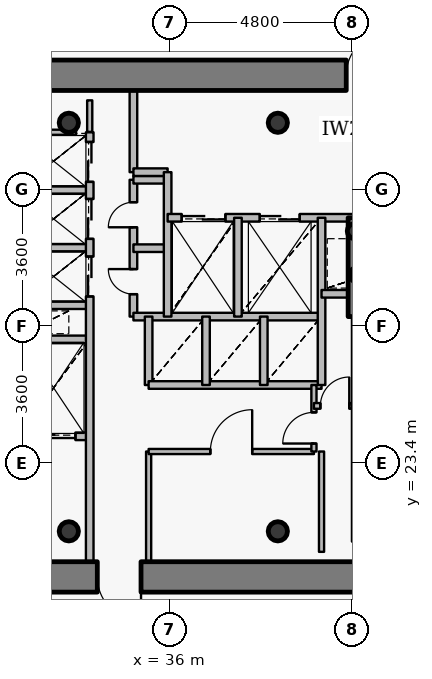
"""IFC4 building model, lengths in metres.
Left out: names, types, materials, properties, quantities, classifications, styles, units other than length and angle.
Written with IfcOpenShell. Run it as: python <this file> out.ifc"""

import sys

from ifc_helpers import new_model, si_unit, direction, frame, frame_2d, origin, origin_2d, place, context, subcontext, project, spatial, rectangle, hollow_circle, extrude, source, transform, mapped, element, fill, save


model = new_model("IFC4")
c1 = context("Model", 3, precision=1e-05, world=origin(), true_north=direction((0.0, 1.0)))
c2 = subcontext(c1, "Body", "Model", "MODEL_VIEW")
j1 = project(units=[si_unit("LENGTHUNIT", "METRE"), si_unit("PLANEANGLEUNIT", "RADIAN")], contexts=[c1])
p1 = place(None, origin())
s1 = spatial("IfcSite", under=j1, at=p1, CompositionType="ELEMENT")
p2 = place(p1, origin())
s2 = spatial("IfcBuilding", under=s1, at=p2, CompositionType="ELEMENT")
p3 = place(p2, frame((0.0, 0.0, 197.4)))
s3 = spatial("IfcBuildingStorey", under=s2, at=p3, CompositionType="ELEMENT", Elevation=197.4)
for number, where, z_axis, x_axis in (
    (1, (33.35, 21.6, 0.0), (0.0, 0.0, 1.0), (1.0, 0.0, 0.0)),
    (2, (38.85, 21.6, 0.0), (0.0, 0.0, 1.0), (1.0, 0.0, 0.0)),
    (3, (38.85, 32.35, 0.0), (0.0, 0.0, 1.0), (1.0, 0.0, 0.0)),
    (4, (33.35, 32.35, 0.0), (0.0, 0.0, 1.0), (1.0, 0.0, 0.0)),
):
    element("IfcColumn", number, at=place(p3, frame(where, z_axis=z_axis, x_axis=x_axis)), inside=s3, PredefinedType="COLUMN", context=c2, shape_type="SweptSolid", body=[
        extrude(hollow_circle(Radius=0.254, WallThickness=0.02, at=origin_2d()), origin(), (0.0, 0.0, 1.0), 3.75),
    ])
for number, where, z_axis, x_axis in (
    (5, (40.95, 28.35, 0.0), (0.0, 0.0, 1.0), (1.0, 0.0, 0.0)),
    (6, (40.88, 29.5, 0.0), (0.0, 0.0, 1.0), (1.0, 0.0, 0.0)),
):
    element("IfcColumn", number, at=place(p3, frame(where, z_axis=z_axis, x_axis=x_axis)), inside=s3, PredefinedType="COLUMN", context=c2, shape_type="SweptSolid", body=[
        extrude(hollow_circle(Radius=0.203, WallThickness=0.016, at=origin_2d()), origin(), (0.0, 0.0, 1.0), 3.75),
    ])
p4 = place(p3, frame((27.2, 33.6, 0.0), z_axis=(0.0, 0.0, 1.0), x_axis=(1.0, 0.0, 0.0)))
e7 = element("IfcWall", 7, at=p4, inside=s3, PredefinedType="SHEAR", context=c2, shape_type="SweptSolid", body=[
    extrude(rectangle(XDim=17.6, YDim=0.8, at=frame_2d((8.8, 0.0))), origin(), (0.0, 0.0, 1.0), 2.95),
])
p5 = place(p4, frame((13.45, 0.0, 0.0)))
e8 = element("IfcOpeningElement", 8, at=p5, cuts=e7, PredefinedType="OPENING", context=c2, shape_type="SweptSolid", body=[
    extrude(rectangle(XDim=1.15, YDim=2.15, at=origin_2d()), frame((0.575, 0.41, 1.075), z_axis=(0.0, -1.0, 0.0), x_axis=(1.0, 0.0, 0.0)), (0.0, 0.0, 1.0), 0.82),
])
p6 = place(p3, frame((44.8, 20.4, 0.0), z_axis=(0.0, 0.0, 1.0), x_axis=(-1.0, 0.0, 0.0)))
e9 = element("IfcWall", 9, at=p6, inside=s3, PredefinedType="SHEAR", context=c2, shape_type="SweptSolid", body=[
    extrude(rectangle(XDim=17.6, YDim=0.8, at=frame_2d((8.8, 0.0))), origin(), (0.0, 0.0, 1.0), 2.95),
])
p7 = place(p6, frame((9.55, 0.0, 0.0)))
e10 = element("IfcOpeningElement", 10, at=p7, cuts=e9, PredefinedType="OPENING", context=c2, shape_type="SweptSolid", body=[
    extrude(rectangle(XDim=1.15, YDim=2.15, at=origin_2d()), frame((0.575, 0.41, 1.075), z_axis=(0.0, -1.0, 0.0), x_axis=(1.0, 0.0, 0.0)), (0.0, 0.0, 1.0), 0.82),
])
p8 = place(p3, frame((40.9, 27.25, 0.0), z_axis=(0.0, 0.0, 1.0), x_axis=(0.0, 1.0, 0.0)))
e11 = element("IfcWall", 11, at=p8, inside=s3, PredefinedType="SHEAR", context=c2, shape_type="SweptSolid", body=[
    extrude(rectangle(XDim=2.6, YDim=0.4, at=frame_2d((1.3, 0.0))), origin(), (0.0, 0.0, 1.0), 3.1),
])
p9 = place(p3, frame((32.0, 24.1, 0.0), z_axis=(0.0, 0.0, 1.0), x_axis=(1.0, 0.0, 0.0)))
e12 = element("IfcWall", 12, at=p9, inside=s3, PredefinedType="PARTITIONING", context=c2, shape_type="SweptSolid", body=[
    extrude(rectangle(XDim=1.9, YDim=0.2, at=frame_2d((0.95, 0.0))), origin(), (0.0, 0.0, 1.0), 3.085),
])
p10 = place(p9, frame((0.375, 0.0, 0.0)))
e13 = element("IfcOpeningElement", 13, at=p10, cuts=e12, PredefinedType="OPENING", context=c2, shape_type="SweptSolid", body=[
    extrude(rectangle(XDim=1.15, YDim=2.15, at=origin_2d()), frame((0.575, 0.11, 1.075), z_axis=(0.0, -1.0, 0.0), x_axis=(1.0, 0.0, 0.0)), (0.0, 0.0, 1.0), 0.22),
])
for number, where, z_axis, x_axis in (
    (14, (32.0, 26.65, 0.0), (0.0, 0.0, 1.0), (1.0, 0.0, 0.0)),
    (15, (32.0, 27.55, 0.0), (0.0, 0.0, 1.0), (1.0, 0.0, 0.0)),
    (16, (32.0, 29.06, 0.0), (0.0, 0.0, 1.0), (1.0, 0.0, 0.0)),
    (17, (32.0, 30.58, 0.0), (0.0, 0.0, 1.0), (1.0, 0.0, 0.0)),
):
    element("IfcWall", number, at=place(p3, frame(where, z_axis=z_axis, x_axis=x_axis)), inside=s3, PredefinedType="PARTITIONING", context=c2, shape_type="SweptSolid", body=[
        extrude(rectangle(XDim=1.9, YDim=0.2, at=frame_2d((0.95, 0.0))), origin(), (0.0, 0.0, 1.0), 3.085),
    ])
p11 = place(p3, frame((33.9, 20.8, 0.0), z_axis=(0.0, 0.0, 1.0), x_axis=(0.0, 1.0, 0.0)))
e18 = element("IfcWall", 18, at=p11, inside=s3, PredefinedType="PARTITIONING", context=c2, shape_type="SweptSolid", body=[
    extrude(rectangle(XDim=11.3, YDim=0.2, at=frame_2d((5.65, 0.0))), origin(), (0.0, 0.0, 1.0), 3.085),
])
p12 = place(p11, frame((6.98, 0.0, 0.0)))
e19 = element("IfcOpeningElement", 19, at=p12, cuts=e18, PredefinedType="OPENING", context=c2, shape_type="SweptSolid", body=[
    extrude(rectangle(XDim=1.05, YDim=2.15, at=origin_2d()), frame((0.525, 0.11, 1.075), z_axis=(0.0, -1.0, 0.0), x_axis=(1.0, 0.0, 0.0)), (0.0, 0.0, 1.0), 0.22),
])
p13 = place(p11, frame((8.495, 0.0, 0.0)))
e20 = element("IfcOpeningElement", 20, at=p13, cuts=e18, PredefinedType="OPENING", context=c2, shape_type="SweptSolid", body=[
    extrude(rectangle(XDim=1.05, YDim=2.15, at=origin_2d()), frame((0.525, 0.11, 1.075), z_axis=(0.0, -1.0, 0.0), x_axis=(1.0, 0.0, 0.0)), (0.0, 0.0, 1.0), 0.22),
])
p14 = place(p11, frame((9.995, 0.0, 0.0)))
e21 = element("IfcOpeningElement", 21, at=p14, cuts=e18, PredefinedType="OPENING", context=c2, shape_type="SweptSolid", body=[
    extrude(rectangle(XDim=1.05, YDim=2.15, at=origin_2d()), frame((0.525, 0.11, 1.075), z_axis=(0.0, -1.0, 0.0), x_axis=(1.0, 0.0, 0.0)), (0.0, 0.0, 1.0), 0.22),
])
p15 = place(p3, frame((35.05, 27.25, 0.0), z_axis=(0.0, 0.0, 1.0), x_axis=(0.0, 1.0, 0.0)))
e22 = element("IfcWall", 22, at=p15, inside=s3, PredefinedType="PARTITIONING", context=c2, shape_type="SweptSolid", body=[
    extrude(rectangle(XDim=3.6, YDim=0.2, at=frame_2d((1.8, 0.0))), origin(), (0.0, 0.0, 1.0), 3.5),
])
p16 = place(p15, frame((0.59, 0.0, 0.0)))
e23 = element("IfcOpeningElement", 23, at=p16, cuts=e22, PredefinedType="OPENING", context=c2, shape_type="SweptSolid", body=[
    extrude(rectangle(XDim=0.66, YDim=2.05, at=origin_2d()), frame((0.33, 0.11, 1.025), z_axis=(0.0, -1.0, 0.0), x_axis=(1.0, 0.0, 0.0)), (0.0, 0.0, 1.0), 0.22),
])
p17 = place(p15, frame((2.35, 0.0, 0.0)))
e24 = element("IfcOpeningElement", 24, at=p17, cuts=e22, PredefinedType="OPENING", context=c2, shape_type="SweptSolid", body=[
    extrude(rectangle(XDim=0.66, YDim=2.05, at=origin_2d()), frame((0.33, 0.11, 1.025), z_axis=(0.0, -1.0, 0.0), x_axis=(1.0, 0.0, 0.0)), (0.0, 0.0, 1.0), 0.22),
])
p18 = place(p3, frame((35.05, 27.25, 0.0), z_axis=(0.0, 0.0, 1.0), x_axis=(1.0, 0.0, 0.0)))
e25 = element("IfcWall", 25, at=p18, inside=s3, PredefinedType="PARTITIONING", context=c2, shape_type="SweptSolid", body=[
    extrude(rectangle(XDim=4.95, YDim=0.2, at=frame_2d((2.475, 0.0))), origin(), (0.0, 0.0, 1.0), 3.085),
])
for number, where, z_axis, x_axis in (
    (26, (35.05, 29.05, 0.0), (0.0, 0.0, 1.0), (1.0, 0.0, 0.0)),
    (27, (35.05, 30.85, 0.0), (0.0, 0.0, 1.0), (1.0, 0.0, 0.0)),
):
    element("IfcWall", number, at=place(p3, frame(where, z_axis=z_axis, x_axis=x_axis)), inside=s3, PredefinedType="PARTITIONING", context=c2, shape_type="SweptSolid", body=[
        extrude(rectangle(XDim=0.9, YDim=0.2, at=frame_2d((0.45, 0.0))), origin(), (0.0, 0.0, 1.0), 3.5),
    ])
p19 = place(p3, frame((35.05, 31.05, 0.0), z_axis=(0.0, 0.0, 1.0), x_axis=(0.0, 1.0, 0.0)))
e28 = element("IfcWall", 28, at=p19, inside=s3, PredefinedType="PARTITIONING", context=c2, shape_type="SweptSolid", body=[
    extrude(rectangle(XDim=2.15, YDim=0.2, at=frame_2d((1.075, 0.0))), origin(), (0.0, 0.0, 1.0), 3.085),
])
p20 = place(p3, frame((35.05, 31.05, 0.0), z_axis=(0.0, 0.0, 1.0), x_axis=(1.0, 0.0, 0.0)))
e29 = element("IfcWall", 29, at=p20, inside=s3, PredefinedType="PARTITIONING", context=c2, shape_type="SweptSolid", body=[
    extrude(rectangle(XDim=0.9, YDim=0.2, at=frame_2d((0.45, 0.0))), origin(), (0.0, 0.0, 1.0), 3.5),
])
p21 = place(p3, frame((35.45, 20.8, 0.0), z_axis=(0.0, 0.0, 1.0), x_axis=(0.0, 1.0, 0.0)))
e30 = element("IfcWall", 30, at=p21, inside=s3, PredefinedType="PARTITIONING", context=c2, shape_type="SweptSolid", body=[
    extrude(rectangle(XDim=2.9, YDim=0.135, at=frame_2d((1.45, 0.0))), origin(), (0.0, 0.0, 1.0), 3.085),
])
p22 = place(p3, frame((35.45, 23.7, 0.0), z_axis=(0.0, 0.0, 1.0), x_axis=(1.0, 0.0, 0.0)))
e31 = element("IfcWall", 31, at=p22, inside=s3, PredefinedType="PARTITIONING", context=c2, shape_type="SweptSolid", body=[
    extrude(rectangle(XDim=4.35, YDim=0.135, at=frame_2d((2.175, 0.0))), origin(), (0.0, 0.0, 1.0), 3.085),
])
p23 = place(p22, frame((1.625, 0.0, 0.0)))
e32 = element("IfcOpeningElement", 32, at=p23, cuts=e31, PredefinedType="OPENING", context=c2, shape_type="SweptSolid", body=[
    extrude(rectangle(XDim=1.1, YDim=2.15, at=origin_2d()), frame((0.55, 0.078, 1.075), z_axis=(0.0, -1.0, 0.0), x_axis=(1.0, 0.0, 0.0)), (0.0, 0.0, 1.0), 0.155),
])
p24 = place(p3, frame((35.45, 25.45, 0.0), z_axis=(0.0, 0.0, 1.0), x_axis=(0.0, 1.0, 0.0)))
e33 = element("IfcWall", 33, at=p24, inside=s3, PredefinedType="PARTITIONING", context=c2, shape_type="SweptSolid", body=[
    extrude(rectangle(XDim=1.8, YDim=0.2, at=frame_2d((0.9, 0.0))), origin(), (0.0, 0.0, 1.0), 3.5),
])
p25 = place(p3, frame((35.45, 25.45, 0.0), z_axis=(0.0, 0.0, 1.0), x_axis=(1.0, 0.0, 0.0)))
e34 = element("IfcWall", 34, at=p25, inside=s3, PredefinedType="PARTITIONING", context=c2, shape_type="SweptSolid", body=[
    extrude(rectangle(XDim=4.55, YDim=0.2, at=frame_2d((2.275, 0.0))), origin(), (0.0, 0.0, 1.0), 3.085),
])
p26 = place(p3, frame((35.95, 27.25, 0.0), z_axis=(0.0, 0.0, 1.0), x_axis=(0.0, 1.0, 0.0)))
e35 = element("IfcWall", 35, at=p26, inside=s3, PredefinedType="PARTITIONING", context=c2, shape_type="SweptSolid", body=[
    extrude(rectangle(XDim=3.8, YDim=0.2, at=frame_2d((1.9, 0.0))), origin(), (0.0, 0.0, 1.0), 3.5),
])
p27 = place(p3, frame((35.95, 29.85, 0.0), z_axis=(0.0, 0.0, 1.0), x_axis=(1.0, 0.0, 0.0)))
e36 = element("IfcWall", 36, at=p27, inside=s3, PredefinedType="PARTITIONING", context=c2, shape_type="SweptSolid", body=[
    extrude(rectangle(XDim=8.49, YDim=0.2, at=frame_2d((4.245, 0.0))), origin(), (0.0, 0.0, 1.0), 3.085),
])
p28 = place(p27, frame((6.1, 0.0, 0.0)))
e37 = element("IfcOpeningElement", 37, at=p28, cuts=e36, PredefinedType="OPENING", context=c2, shape_type="SweptSolid", body=[
    extrude(rectangle(XDim=1.2, YDim=2.15, at=origin_2d()), frame((0.6, 0.11, 1.075), z_axis=(0.0, -1.0, 0.0), x_axis=(1.0, 0.0, 0.0)), (0.0, 0.0, 1.0), 0.22),
])
p29 = place(p27, frame((0.37, 0.0, 0.0)))
e38 = element("IfcOpeningElement", 38, at=p29, cuts=e36, PredefinedType="OPENING", context=c2, shape_type="SweptSolid", body=[
    extrude(rectangle(XDim=1.15, YDim=2.15, at=origin_2d()), frame((0.575, 0.11, 1.075), z_axis=(0.0, -1.0, 0.0), x_axis=(1.0, 0.0, 0.0)), (0.0, 0.0, 1.0), 0.22),
])
p30 = place(p27, frame((2.425, 0.0, 0.0)))
e39 = element("IfcOpeningElement", 39, at=p30, cuts=e36, PredefinedType="OPENING", context=c2, shape_type="SweptSolid", body=[
    extrude(rectangle(XDim=1.05, YDim=2.15, at=origin_2d()), frame((0.525, 0.11, 1.075), z_axis=(0.0, -1.0, 0.0), x_axis=(1.0, 0.0, 0.0)), (0.0, 0.0, 1.0), 0.22),
])
p31 = place(p3, frame((36.96, 25.45, 0.0), z_axis=(0.0, 0.0, 1.0), x_axis=(0.0, 1.0, 0.0)))
e40 = element("IfcWall", 40, at=p31, inside=s3, PredefinedType="PARTITIONING", context=c2, shape_type="SweptSolid", body=[
    extrude(rectangle(XDim=1.8, YDim=0.2, at=frame_2d((0.9, 0.0))), origin(), (0.0, 0.0, 1.0), 3.5),
])
p32 = place(p3, frame((37.8, 27.25, 0.0), z_axis=(0.0, 0.0, 1.0), x_axis=(0.0, 1.0, 0.0)))
e41 = element("IfcWall", 41, at=p32, inside=s3, PredefinedType="PARTITIONING", context=c2, shape_type="SweptSolid", body=[
    extrude(rectangle(XDim=2.6, YDim=0.2, at=frame_2d((1.3, 0.0))), origin(), (0.0, 0.0, 1.0), 3.5),
])
p33 = place(p3, frame((38.48, 25.45, 0.0), z_axis=(0.0, 0.0, 1.0), x_axis=(0.0, 1.0, 0.0)))
e42 = element("IfcWall", 42, at=p33, inside=s3, PredefinedType="PARTITIONING", context=c2, shape_type="SweptSolid", body=[
    extrude(rectangle(XDim=1.8, YDim=0.2, at=frame_2d((0.9, 0.0))), origin(), (0.0, 0.0, 1.0), 3.5),
])
p34 = place(p3, frame((39.8, 23.7, 0.0), z_axis=(0.0, 0.0, 1.0), x_axis=(0.0, 1.0, 0.0)))
e43 = element("IfcWall", 43, at=p34, inside=s3, PredefinedType="PARTITIONING", context=c2, shape_type="SweptSolid", body=[
    extrude(rectangle(XDim=1.75, YDim=0.135, at=frame_2d((0.875, 0.0))), origin(), (0.0, 0.0, 1.0), 3.5),
])
p35 = place(p34, frame((0.21, 0.0, 0.0)))
e44 = element("IfcOpeningElement", 44, at=p35, cuts=e43, PredefinedType="OPENING", context=c2, shape_type="SweptSolid", body=[
    extrude(rectangle(XDim=0.82, YDim=2.1, at=origin_2d()), frame((0.41, 0.078, 1.05), z_axis=(0.0, -1.0, 0.0), x_axis=(1.0, 0.0, 0.0)), (0.0, 0.0, 1.0), 0.155),
])
p36 = place(p3, frame((39.8, 24.9, 0.0), z_axis=(0.0, 0.0, 1.0), x_axis=(1.0, 0.0, 0.0)))
e45 = element("IfcWall", 45, at=p36, inside=s3, PredefinedType="PARTITIONING", context=c2, shape_type="SweptSolid", body=[
    extrude(rectangle(XDim=1.1, YDim=0.15, at=frame_2d((0.55, 0.0))), origin(), (0.0, 0.0, 1.0), 3.5),
])
p37 = place(p36, frame((0.17, 0.0, 0.0)))
e46 = element("IfcOpeningElement", 46, at=p37, cuts=e45, PredefinedType="OPENING", context=c2, shape_type="SweptSolid", body=[
    extrude(rectangle(XDim=0.76, YDim=2.1, at=origin_2d()), frame((0.38, 0.085, 1.05), z_axis=(0.0, -1.0, 0.0), x_axis=(1.0, 0.0, 0.0)), (0.0, 0.0, 1.0), 0.17),
])
p38 = place(p3, frame((40.0, 25.45, 0.0), z_axis=(0.0, 0.0, 1.0), x_axis=(0.0, 1.0, 0.0)))
e47 = element("IfcWall", 47, at=p38, inside=s3, PredefinedType="PARTITIONING", context=c2, shape_type="SweptSolid", body=[
    extrude(rectangle(XDim=4.4, YDim=0.2, at=frame_2d((2.2, 0.0))), origin(), (0.0, 0.0, 1.0), 3.5),
])
p39 = place(p3, frame((40.0, 27.85, 0.0), z_axis=(0.0, 0.0, 1.0), x_axis=(1.0, 0.0, 0.0)))
e48 = element("IfcWall", 48, at=p39, inside=s3, PredefinedType="PARTITIONING", context=c2, shape_type="SweptSolid", body=[
    extrude(rectangle(XDim=0.9, YDim=0.2, at=frame_2d((0.45, 0.0))), origin(), (0.0, 0.0, 1.0), 3.5),
])
p40 = place(p3, frame((40.9, 21.33, 0.0), z_axis=(0.0, 0.0, 1.0), x_axis=(0.0, 1.0, 0.0)))
e49 = element("IfcWall", 49, at=p40, inside=s3, PredefinedType="PARTITIONING", context=c2, shape_type="SweptSolid", body=[
    extrude(rectangle(XDim=5.91, YDim=0.2, at=frame_2d((2.955, 0.0))), origin(), (0.0, 0.0, 1.0), 3.035),
])
p41 = place(p3, frame((32.36, 32.1, 0.0), z_axis=(0.0, 0.0, 1.0), x_axis=(1.0, 0.0, 0.0)))
e50 = element("IfcWall", 50, at=p41, inside=s3, PredefinedType="PARTITIONING", context=c2, shape_type="SweptSolid", body=[
    extrude(rectangle(XDim=1.18, YDim=0.135, at=frame_2d((0.59, 0.0))), origin(), (0.0, 0.0, 1.0), 3.085),
])
p42 = place(p3, frame((40.0, 23.7, 0.0), z_axis=(0.0, 0.0, 1.0), x_axis=(0.0, -1.0, 0.0)))
e51 = element("IfcWall", 51, at=p42, inside=s3, PredefinedType="PARTITIONING", context=c2, shape_type="SweptSolid", body=[
    extrude(rectangle(XDim=2.64, YDim=0.135, at=frame_2d((1.32, 0.0))), origin(), (0.0, 0.0, 1.0), 3.035),
])
p43 = place(p3, frame((33.9, 32.11, 0.0), z_axis=(0.0, 0.0, 1.0), x_axis=(0.0, 1.0, 0.0)))
e52 = element("IfcWall", 52, at=p43, inside=s3, PredefinedType="PARTITIONING", context=c2, shape_type="SweptSolid", body=[
    extrude(rectangle(XDim=0.83, YDim=0.135, at=frame_2d((0.415, 0.0))), origin(), (0.0, 0.0, 1.0), 3.085),
])
m1 = source(origin(), c2, "Body", "SweptSolid", [
    extrude(rectangle(XDim=1.15, YDim=2.15, at=origin_2d()), frame((0.575, 0.025, 1.075), z_axis=(0.0, -1.0, 0.0), x_axis=(1.0, 0.0, 0.0)), (0.0, 0.0, 1.0), 0.05),
])
p44 = place(p5, origin())
e53 = element("IfcDoor", 53, at=p44, inside=s3, OperationType="SINGLE_SWING_RIGHT", PredefinedType="DOOR", context=c2, shape_type="MappedRepresentation", body=[
    mapped(m1, transform((0.0, 0.0, 0.0), x_axis=(1.0, 0.0, 0.0), y_axis=(0.0, 1.0, 0.0), z_axis=(0.0, 0.0, 1.0), scale=1.0)),
])
fill(e8, e53)
p45 = place(p7, origin())
e54 = element("IfcDoor", 54, at=p45, inside=s3, OperationType="SINGLE_SWING_LEFT", PredefinedType="DOOR", context=c2, shape_type="MappedRepresentation", body=[
    mapped(m1, transform((0.0, 0.0, 0.0), x_axis=(1.0, 0.0, 0.0), y_axis=(0.0, 1.0, 0.0), z_axis=(0.0, 0.0, 1.0), scale=1.0)),
])
fill(e10, e54)
m2 = source(origin(), c2, "Body", "SweptSolid", [
    extrude(rectangle(XDim=1.15, YDim=2.15, at=origin_2d()), frame((0.575, 0.025, 1.075), z_axis=(0.0, -1.0, 0.0), x_axis=(1.0, 0.0, 0.0)), (0.0, 0.0, 1.0), 0.05),
])
p46 = place(p29, origin())
e55 = element("IfcDoor", 55, at=p46, inside=s3, OperationType="DOUBLE_DOOR_SLIDING", PredefinedType="USERDEFINED", context=c2, shape_type="MappedRepresentation", body=[
    mapped(m2, transform((0.0, 0.0, 0.0), x_axis=(1.0, 0.0, 0.0), y_axis=(0.0, 1.0, 0.0), z_axis=(0.0, 0.0, 1.0), scale=1.0)),
])
fill(e38, e55)
p47 = place(p10, origin())
e56 = element("IfcDoor", 56, at=p47, inside=s3, OperationType="DOUBLE_DOOR_SLIDING", PredefinedType="USERDEFINED", context=c2, shape_type="MappedRepresentation", body=[
    mapped(m2, transform((0.0, 0.0, 0.0), x_axis=(1.0, 0.0, 0.0), y_axis=(0.0, 1.0, 0.0), z_axis=(0.0, 0.0, 1.0), scale=1.0)),
])
fill(e13, e56)
m3 = source(origin(), c2, "Body", "SweptSolid", [
    extrude(rectangle(XDim=1.05, YDim=2.15, at=origin_2d()), frame((0.525, 0.025, 1.075), z_axis=(0.0, -1.0, 0.0), x_axis=(1.0, 0.0, 0.0)), (0.0, 0.0, 1.0), 0.05),
])
p48 = place(p30, origin())
e57 = element("IfcDoor", 57, at=p48, inside=s3, OperationType="DOUBLE_DOOR_SLIDING", PredefinedType="USERDEFINED", context=c2, shape_type="MappedRepresentation", body=[
    mapped(m3, transform((0.0, 0.0, 0.0), x_axis=(1.0, 0.0, 0.0), y_axis=(0.0, 1.0, 0.0), z_axis=(0.0, 0.0, 1.0), scale=1.0)),
])
fill(e39, e57)
p49 = place(p12, origin())
e58 = element("IfcDoor", 58, at=p49, inside=s3, OperationType="DOUBLE_DOOR_SLIDING", PredefinedType="USERDEFINED", context=c2, shape_type="MappedRepresentation", body=[
    mapped(m3, transform((0.0, 0.0, 0.0), x_axis=(1.0, 0.0, 0.0), y_axis=(0.0, 1.0, 0.0), z_axis=(0.0, 0.0, 1.0), scale=1.0)),
])
fill(e19, e58)
p50 = place(p13, origin())
e59 = element("IfcDoor", 59, at=p50, inside=s3, OperationType="DOUBLE_DOOR_SLIDING", PredefinedType="USERDEFINED", context=c2, shape_type="MappedRepresentation", body=[
    mapped(m3, transform((0.0, 0.0, 0.0), x_axis=(1.0, 0.0, 0.0), y_axis=(0.0, 1.0, 0.0), z_axis=(0.0, 0.0, 1.0), scale=1.0)),
])
fill(e20, e59)
p51 = place(p14, origin())
e60 = element("IfcDoor", 60, at=p51, inside=s3, OperationType="DOUBLE_DOOR_SLIDING", PredefinedType="USERDEFINED", context=c2, shape_type="MappedRepresentation", body=[
    mapped(m3, transform((0.0, 0.0, 0.0), x_axis=(1.0, 0.0, 0.0), y_axis=(0.0, 1.0, 0.0), z_axis=(0.0, 0.0, 1.0), scale=1.0)),
])
fill(e21, e60)
m4 = source(origin(), c2, "Body", "SweptSolid", [
    extrude(rectangle(XDim=0.66, YDim=2.05, at=origin_2d()), frame((0.33, 0.025, 1.025), z_axis=(0.0, -1.0, 0.0), x_axis=(1.0, 0.0, 0.0)), (0.0, 0.0, 1.0), 0.05),
])
p52 = place(p16, origin())
e61 = element("IfcDoor", 61, at=p52, inside=s3, OperationType="SINGLE_SWING_RIGHT", PredefinedType="USERDEFINED", context=c2, shape_type="MappedRepresentation", body=[
    mapped(m4, transform((0.0, 0.0, 0.0), x_axis=(1.0, 0.0, 0.0), y_axis=(0.0, 1.0, 0.0), z_axis=(0.0, 0.0, 1.0), scale=1.0)),
])
fill(e23, e61)
p53 = place(p17, origin())
e62 = element("IfcDoor", 62, at=p53, inside=s3, OperationType="SINGLE_SWING_LEFT", PredefinedType="USERDEFINED", context=c2, shape_type="MappedRepresentation", body=[
    mapped(m4, transform((0.0, 0.0, 0.0), x_axis=(1.0, 0.0, 0.0), y_axis=(0.0, 1.0, 0.0), z_axis=(0.0, 0.0, 1.0), scale=1.0)),
])
fill(e24, e62)
m5 = source(origin(), c2, "Body", "SweptSolid", [
    extrude(rectangle(XDim=1.1, YDim=2.15, at=origin_2d()), frame((0.55, 0.025, 1.075), z_axis=(0.0, -1.0, 0.0), x_axis=(1.0, 0.0, 0.0)), (0.0, 0.0, 1.0), 0.05),
])
p54 = place(p23, origin())
e63 = element("IfcDoor", 63, at=p54, inside=s3, OperationType="SINGLE_SWING_RIGHT", PredefinedType="DOOR", context=c2, shape_type="MappedRepresentation", body=[
    mapped(m5, transform((0.0, 0.0, 0.0), x_axis=(1.0, 0.0, 0.0), y_axis=(0.0, 1.0, 0.0), z_axis=(0.0, 0.0, 1.0), scale=1.0)),
])
fill(e32, e63)
m6 = source(origin(), c2, "Body", "SweptSolid", [
    extrude(rectangle(XDim=0.82, YDim=2.1, at=origin_2d()), frame((0.41, 0.025, 1.05), z_axis=(0.0, -1.0, 0.0), x_axis=(1.0, 0.0, 0.0)), (0.0, 0.0, 1.0), 0.05),
])
p55 = place(p35, origin())
e64 = element("IfcDoor", 64, at=p55, inside=s3, OperationType="SINGLE_SWING_LEFT", PredefinedType="DOOR", context=c2, shape_type="MappedRepresentation", body=[
    mapped(m6, transform((0.0, 0.0, 0.0), x_axis=(1.0, 0.0, 0.0), y_axis=(0.0, 1.0, 0.0), z_axis=(0.0, 0.0, 1.0), scale=1.0)),
])
fill(e44, e64)
m7 = source(origin(), c2, "Body", "SweptSolid", [
    extrude(rectangle(XDim=0.76, YDim=2.1, at=origin_2d()), frame((0.38, 0.025, 1.05), z_axis=(0.0, -1.0, 0.0), x_axis=(1.0, 0.0, 0.0)), (0.0, 0.0, 1.0), 0.05),
])
p56 = place(p37, origin())
e65 = element("IfcDoor", 65, at=p56, inside=s3, OperationType="SINGLE_SWING_RIGHT", PredefinedType="DOOR", context=c2, shape_type="MappedRepresentation", body=[
    mapped(m7, transform((0.0, 0.0, 0.0), x_axis=(1.0, 0.0, 0.0), y_axis=(0.0, 1.0, 0.0), z_axis=(0.0, 0.0, 1.0), scale=1.0)),
])
fill(e46, e65)
save(model, sys.argv[1])
